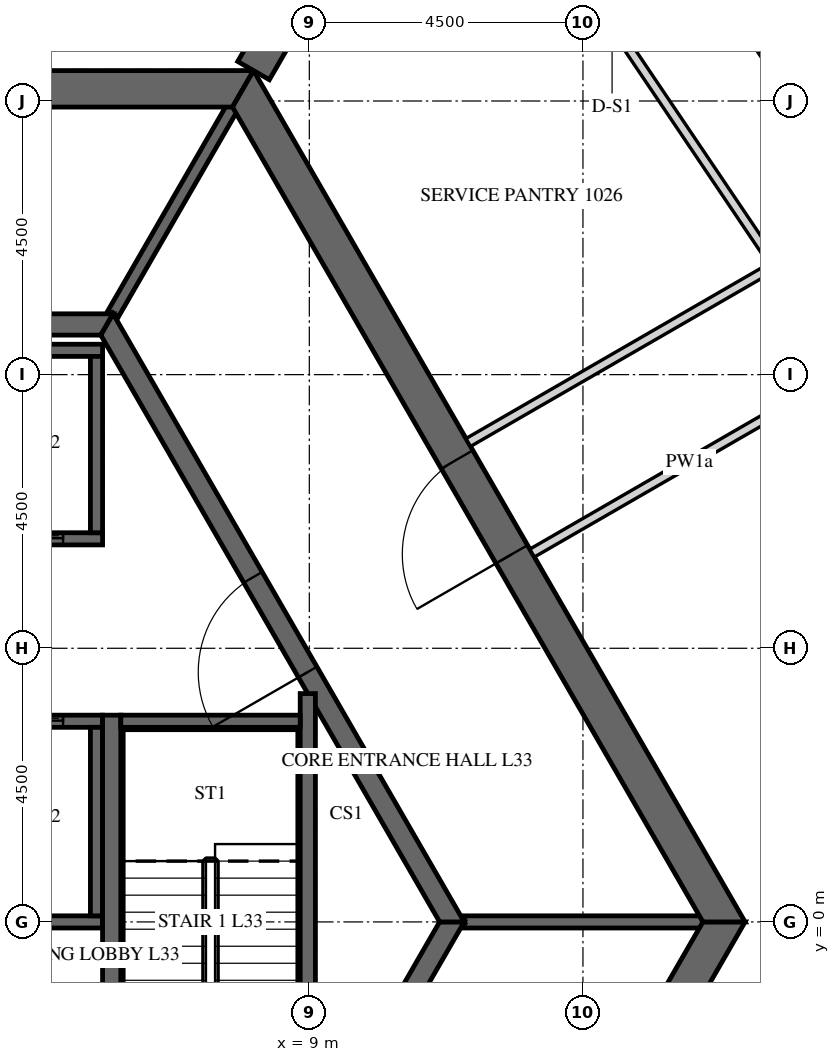
"""IFC4 building model, lengths in metres.
Left out: names, types, materials, properties, quantities, classifications, styles, units other than length and angle.
Written with IfcOpenShell. Run it as: python <this file> out.ifc"""

import sys

from ifc_helpers import new_model, si_unit, direction, frame, frame_2d, origin, place, context, subcontext, project, spatial, polyline, rectangle, outline, extrude, element, fill, save


model = new_model("IFC4")
c1 = context("Model", 3, precision=1e-05, world=origin(), true_north=direction((0.0, 1.0)))
c2 = subcontext(c1, "Body", "Model", "MODEL_VIEW")
j1 = project(units=[si_unit("LENGTHUNIT", "METRE"), si_unit("PLANEANGLEUNIT", "RADIAN")], contexts=[c1])
p1 = place(None, origin())
s1 = spatial("IfcSite", under=j1, at=p1, CompositionType="ELEMENT")
p2 = place(p1, origin())
s2 = spatial("IfcBuilding", under=s1, at=p2, CompositionType="ELEMENT")
p3 = place(p2, frame((0.0, 0.0, 142.8)))
s3 = spatial("IfcBuildingStorey", under=s2, at=p3, CompositionType="ELEMENT", Elevation=142.8)
p4 = place(p3, frame((7.91, -13.7, -0.15), z_axis=(0.0, 0.0, 1.0), x_axis=(0.499999880136, 0.866025472988, 0.0)))
e1 = element("IfcWall", 1, at=p4, inside=s3, PredefinedType="SHEAR", context=c2, shape_type="SweptSolid", body=[
    extrude(outline(polyline([(-0.173, -0.3), (15.993, -0.3), (15.646, 0.3), (0.173, 0.3), (-0.173, -0.3)])), origin(), (0.0, 0.0, 1.0), 3.75),
])
p5 = place(p4, frame((7.039, 0.0, 0.15)))
e2 = element("IfcOpeningElement", 2, at=p5, cuts=e1, PredefinedType="OPENING", context=c2, shape_type="SweptSolid", body=[
    extrude(rectangle(XDim=1.8, YDim=2.4, at=frame_2d((0.9, 1.2))), frame((0.0, 0.31, 0.0), z_axis=(0.0, -1.0, 0.0), x_axis=(1.0, 0.0, 0.0)), (0.0, 0.0, 1.0), 0.62),
])
p6 = place(p3, frame((15.819, 0.0, -0.15), z_axis=(0.0, 0.0, 1.0), x_axis=(-0.499999880136, 0.866025472988, 0.0)))
e3 = element("IfcWall", 3, at=p6, inside=s3, PredefinedType="SHEAR", context=c2, shape_type="SweptSolid", body=[
    extrude(outline(polyline([(-0.173, -0.3), (15.993, -0.3), (15.646, 0.3), (0.173, 0.3), (-0.173, -0.3)])), origin(), (0.0, 0.0, 1.0), 3.75),
])
p7 = place(p6, frame((6.981, 0.0, 0.15)))
e4 = element("IfcOpeningElement", 4, at=p7, cuts=e3, PredefinedType="OPENING", context=c2, shape_type="SweptSolid", body=[
    extrude(rectangle(XDim=1.8, YDim=2.4, at=frame_2d((0.9, 1.2))), frame((0.0, 0.31, 0.0), z_axis=(0.0, -1.0, 0.0), x_axis=(1.0, 0.0, 0.0)), (0.0, 0.0, 1.0), 0.62),
])
p8 = place(p3, frame((7.91, 13.7, -0.15), z_axis=(0.0, 0.0, 1.0), x_axis=(-1.0, 0.0, 0.0)))
e5 = element("IfcWall", 5, at=p8, inside=s3, PredefinedType="SHEAR", context=c2, shape_type="SweptSolid", body=[
    extrude(outline(polyline([(-0.173, -0.3), (15.993, -0.3), (15.646, 0.3), (0.173, 0.3), (-0.173, -0.3)])), origin(), (0.0, 0.0, 1.0), 3.75),
])
p9 = place(p8, frame((7.31, 0.0, 0.15)))
e6 = element("IfcOpeningElement", 6, at=p9, cuts=e5, PredefinedType="OPENING", context=c2, shape_type="SweptSolid", body=[
    extrude(rectangle(XDim=1.2, YDim=2.4, at=frame_2d((0.6, 1.2))), frame((0.0, 0.31, 0.0), z_axis=(0.0, -1.0, 0.0), x_axis=(1.0, 0.0, 0.0)), (0.0, 0.0, 1.0), 0.62),
])
p10 = place(p3, frame((8.083, 14.0, -0.15), z_axis=(0.0, 0.0, 1.0), x_axis=(0.499997680643, 0.866026742862, 0.0)))
e7 = element("IfcWall", 7, at=p10, inside=s3, PredefinedType="SHEAR", context=c2, shape_type="SweptSolid", body=[
    extrude(rectangle(XDim=16.509, YDim=0.6, at=frame_2d((8.254, 0.0))), origin(), (0.0, 0.0, 1.0), 3.75),
])
p11 = place(p10, frame((7.354, 0.0, 0.15)))
e8 = element("IfcOpeningElement", 8, at=p11, cuts=e7, PredefinedType="OPENING", context=c2, shape_type="SweptSolid", body=[
    extrude(rectangle(XDim=1.8, YDim=2.4, at=frame_2d((0.9, 1.2))), frame((0.0, 0.31, 0.0), z_axis=(0.0, -1.0, 0.0), x_axis=(1.0, 0.0, 0.0)), (0.0, 0.0, 1.0), 0.62),
])
p12 = place(p3, frame((5.673, -9.825, -0.15), z_axis=(0.0, 0.0, 1.0), x_axis=(0.499995046907, 0.866028263435, 0.0)))
e9 = element("IfcWall", 9, at=p12, inside=s3, PredefinedType="SHEAR", context=c2, shape_type="SweptSolid", body=[
    extrude(outline(polyline([(-0.101, -0.175), (11.446, -0.175), (11.244, 0.175), (0.101, 0.175), (-0.101, -0.175)])), origin(), (0.0, 0.0, 1.0), 3.75),
])
p13 = place(p12, frame((4.801, 0.0, 0.15)))
e10 = element("IfcOpeningElement", 10, at=p13, cuts=e9, PredefinedType="OPENING", context=c2, shape_type="SweptSolid", body=[
    extrude(rectangle(XDim=1.8, YDim=2.4, at=frame_2d((0.9, 1.2))), frame((0.0, 0.185, 0.0), z_axis=(0.0, -1.0, 0.0), x_axis=(1.0, 0.0, 0.0)), (0.0, 0.0, 1.0), 0.37),
])
p14 = place(p3, frame((11.345, 0.0, -0.15), z_axis=(0.0, 0.0, 1.0), x_axis=(-0.499995046907, 0.866028263435, 0.0)))
e11 = element("IfcWall", 11, at=p14, inside=s3, PredefinedType="SHEAR", context=c2, shape_type="SweptSolid", body=[
    extrude(outline(polyline([(-0.101, -0.175), (11.446, -0.175), (11.244, 0.175), (0.101, 0.175), (-0.101, -0.175)])), origin(), (0.0, 0.0, 1.0), 3.75),
])
p15 = place(p14, frame((4.744, 0.0, 0.15)))
e12 = element("IfcOpeningElement", 12, at=p15, cuts=e11, PredefinedType="OPENING", context=c2, shape_type="SweptSolid", body=[
    extrude(rectangle(XDim=1.8, YDim=2.4, at=frame_2d((0.9, 1.2))), frame((0.0, 0.185, 0.0), z_axis=(0.0, -1.0, 0.0), x_axis=(1.0, 0.0, 0.0)), (0.0, 0.0, 1.0), 0.37),
])
p16 = place(p3, frame((5.673, 9.825, -0.15), z_axis=(0.0, 0.0, 1.0), x_axis=(-1.0, 0.0, 0.0)))
e13 = element("IfcWall", 13, at=p16, inside=s3, PredefinedType="SHEAR", context=c2, shape_type="SweptSolid", body=[
    extrude(outline(polyline([(-0.101, -0.175), (11.446, -0.175), (11.244, 0.175), (0.101, 0.175), (-0.101, -0.175)])), origin(), (0.0, 0.0, 1.0), 3.75),
])
p17 = place(p3, frame((-5.6, 6.3, -0.25), z_axis=(0.0, 0.0, 1.0), x_axis=(1.0, 0.0, 0.0)))
e14 = element("IfcWall", 14, at=p17, inside=s3, PredefinedType="SHEAR", context=c2, shape_type="SweptSolid", body=[
    extrude(rectangle(XDim=11.2, YDim=0.2, at=frame_2d((5.6, 0.0))), origin(), (0.0, 0.0, 1.0), 3.9),
])
p18 = place(p17, frame((0.65, 0.0, 0.25)))
e15 = element("IfcOpeningElement", 15, at=p18, cuts=e14, PredefinedType="OPENING", context=c2, shape_type="SweptSolid", body=[
    extrude(rectangle(XDim=1.1, YDim=2.1, at=frame_2d((0.55, 1.05))), frame((0.0, 0.11, 0.0), z_axis=(0.0, -1.0, 0.0), x_axis=(1.0, 0.0, 0.0)), (0.0, 0.0, 1.0), 0.22),
])
p19 = place(p17, frame((2.85, 0.0, 0.25)))
e16 = element("IfcOpeningElement", 16, at=p19, cuts=e14, PredefinedType="OPENING", context=c2, shape_type="SweptSolid", body=[
    extrude(rectangle(XDim=1.1, YDim=2.1, at=frame_2d((0.55, 1.05))), frame((0.0, 0.11, 0.0), z_axis=(0.0, -1.0, 0.0), x_axis=(1.0, 0.0, 0.0)), (0.0, 0.0, 1.0), 0.22),
])
p20 = place(p17, frame((5.05, 0.0, 0.25)))
e17 = element("IfcOpeningElement", 17, at=p20, cuts=e14, PredefinedType="OPENING", context=c2, shape_type="SweptSolid", body=[
    extrude(rectangle(XDim=1.1, YDim=2.1, at=frame_2d((0.55, 1.05))), frame((0.0, 0.11, 0.0), z_axis=(0.0, -1.0, 0.0), x_axis=(1.0, 0.0, 0.0)), (0.0, 0.0, 1.0), 0.22),
])
p21 = place(p17, frame((7.25, 0.0, 0.25)))
e18 = element("IfcOpeningElement", 18, at=p21, cuts=e14, PredefinedType="OPENING", context=c2, shape_type="SweptSolid", body=[
    extrude(rectangle(XDim=1.1, YDim=2.1, at=frame_2d((0.55, 1.05))), frame((0.0, 0.11, 0.0), z_axis=(0.0, -1.0, 0.0), x_axis=(1.0, 0.0, 0.0)), (0.0, 0.0, 1.0), 0.22),
])
p22 = place(p17, frame((9.45, 0.0, 0.25)))
e19 = element("IfcOpeningElement", 19, at=p22, cuts=e14, PredefinedType="OPENING", context=c2, shape_type="SweptSolid", body=[
    extrude(rectangle(XDim=1.1, YDim=2.1, at=frame_2d((0.55, 1.05))), frame((0.0, 0.11, 0.0), z_axis=(0.0, -1.0, 0.0), x_axis=(1.0, 0.0, 0.0)), (0.0, 0.0, 1.0), 0.22),
])
p23 = place(p3, frame((-5.6, 9.4, -0.25), z_axis=(0.0, 0.0, 1.0), x_axis=(1.0, 0.0, 0.0)))
e20 = element("IfcWall", 20, at=p23, inside=s3, PredefinedType="SHEAR", context=c2, shape_type="SweptSolid", body=[
    extrude(rectangle(XDim=11.2, YDim=0.2, at=frame_2d((5.6, 0.0))), origin(), (0.0, 0.0, 1.0), 3.9),
])
p24 = place(p3, frame((5.5, 6.4, -0.25), z_axis=(0.0, 0.0, 1.0), x_axis=(0.0, 1.0, 0.0)))
e21 = element("IfcWall", 21, at=p24, inside=s3, PredefinedType="SHEAR", context=c2, shape_type="SweptSolid", body=[
    extrude(rectangle(XDim=2.9, YDim=0.2, at=frame_2d((1.45, 0.0))), origin(), (0.0, 0.0, 1.0), 3.9),
])
p25 = place(p3, frame((-5.6, 3.3, -0.25), z_axis=(0.0, 0.0, 1.0), x_axis=(1.0, 0.0, 0.0)))
e22 = element("IfcWall", 22, at=p25, inside=s3, PredefinedType="SHEAR", context=c2, shape_type="SweptSolid", body=[
    extrude(rectangle(XDim=11.2, YDim=0.2, at=frame_2d((5.6, 0.0))), origin(), (0.0, 0.0, 1.0), 3.9),
])
p26 = place(p25, frame((0.65, 0.0, 0.25)))
e23 = element("IfcOpeningElement", 23, at=p26, cuts=e22, PredefinedType="OPENING", context=c2, shape_type="SweptSolid", body=[
    extrude(rectangle(XDim=1.1, YDim=2.1, at=frame_2d((0.55, 1.05))), frame((0.0, 0.11, 0.0), z_axis=(0.0, -1.0, 0.0), x_axis=(1.0, 0.0, 0.0)), (0.0, 0.0, 1.0), 0.22),
])
p27 = place(p25, frame((2.85, 0.0, 0.25)))
e24 = element("IfcOpeningElement", 24, at=p27, cuts=e22, PredefinedType="OPENING", context=c2, shape_type="SweptSolid", body=[
    extrude(rectangle(XDim=1.1, YDim=2.1, at=frame_2d((0.55, 1.05))), frame((0.0, 0.11, 0.0), z_axis=(0.0, -1.0, 0.0), x_axis=(1.0, 0.0, 0.0)), (0.0, 0.0, 1.0), 0.22),
])
p28 = place(p25, frame((5.05, 0.0, 0.25)))
e25 = element("IfcOpeningElement", 25, at=p28, cuts=e22, PredefinedType="OPENING", context=c2, shape_type="SweptSolid", body=[
    extrude(rectangle(XDim=1.1, YDim=2.1, at=frame_2d((0.55, 1.05))), frame((0.0, 0.11, 0.0), z_axis=(0.0, -1.0, 0.0), x_axis=(1.0, 0.0, 0.0)), (0.0, 0.0, 1.0), 0.22),
])
p29 = place(p25, frame((7.25, 0.0, 0.25)))
e26 = element("IfcOpeningElement", 26, at=p29, cuts=e22, PredefinedType="OPENING", context=c2, shape_type="SweptSolid", body=[
    extrude(rectangle(XDim=1.1, YDim=2.1, at=frame_2d((0.55, 1.05))), frame((0.0, 0.11, 0.0), z_axis=(0.0, -1.0, 0.0), x_axis=(1.0, 0.0, 0.0)), (0.0, 0.0, 1.0), 0.22),
])
p30 = place(p25, frame((9.45, 0.0, 0.25)))
e27 = element("IfcOpeningElement", 27, at=p30, cuts=e22, PredefinedType="OPENING", context=c2, shape_type="SweptSolid", body=[
    extrude(rectangle(XDim=1.1, YDim=2.1, at=frame_2d((0.55, 1.05))), frame((0.0, 0.11, 0.0), z_axis=(0.0, -1.0, 0.0), x_axis=(1.0, 0.0, 0.0)), (0.0, 0.0, 1.0), 0.22),
])
p31 = place(p3, frame((-5.6, 0.0, -0.25), z_axis=(0.0, 0.0, 1.0), x_axis=(1.0, 0.0, 0.0)))
e28 = element("IfcWall", 28, at=p31, inside=s3, PredefinedType="SHEAR", context=c2, shape_type="SweptSolid", body=[
    extrude(rectangle(XDim=11.2, YDim=0.2, at=frame_2d((5.6, 0.0))), origin(), (0.0, 0.0, 1.0), 3.9),
])
p32 = place(p3, frame((5.5, 0.1, -0.25), z_axis=(0.0, 0.0, 1.0), x_axis=(0.0, 1.0, 0.0)))
e29 = element("IfcWall", 29, at=p32, inside=s3, PredefinedType="SHEAR", context=c2, shape_type="SweptSolid", body=[
    extrude(rectangle(XDim=3.1, YDim=0.2, at=frame_2d((1.55, 0.0))), origin(), (0.0, 0.0, 1.0), 3.9),
])
p33 = place(p3, frame((11.547, 0.0, -0.15), z_axis=(0.0, 0.0, 1.0), x_axis=(1.0, 0.0, 0.0)))
e30 = element("IfcWall", 30, at=p33, inside=s3, PredefinedType="SHEAR", context=c2, shape_type="SweptSolid", body=[
    extrude(rectangle(XDim=3.926, YDim=0.2, at=frame_2d((1.963, 0.0))), origin(), (0.0, 0.0, 1.0), 3.75),
])
p34 = place(p3, frame((5.773, 10.0, -0.15), z_axis=(0.0, 0.0, 1.0), x_axis=(0.500038251005, 0.86600331843, 0.0)))
e31 = element("IfcWall", 31, at=p34, inside=s3, PredefinedType="SHEAR", context=c2, shape_type="SweptSolid", body=[
    extrude(rectangle(XDim=3.926, YDim=0.2, at=frame_2d((1.963, 0.0))), origin(), (0.0, 0.0, 1.0), 3.75),
])
p35 = place(p3, frame((5.75, -3.4, -0.25), z_axis=(0.0, 0.0, 1.0), x_axis=(0.0, 1.0, 0.0)))
e32 = element("IfcWall", 32, at=p35, inside=s3, PredefinedType="SHEAR", context=c2, shape_type="SweptSolid", body=[
    extrude(rectangle(XDim=6.8, YDim=0.3, at=frame_2d((3.4, 0.0))), origin(), (0.0, 0.0, 1.0), 3.9),
])
p36 = place(p3, frame((8.975, -3.755, -0.25), z_axis=(0.0, 0.0, 1.0), x_axis=(0.0, 1.0, 0.0)))
e33 = element("IfcWall", 33, at=p36, inside=s3, PredefinedType="SHEAR", context=c2, shape_type="SweptSolid", body=[
    extrude(rectangle(XDim=7.51, YDim=0.25, at=frame_2d((3.755, 0.0))), origin(), (0.0, 0.0, 1.0), 3.9),
])
p37 = place(p3, frame((5.9, 3.3, -0.25), z_axis=(0.0, 0.0, 1.0), x_axis=(1.0, 0.0, 0.0)))
e34 = element("IfcWall", 34, at=p37, inside=s3, PredefinedType="SHEAR", context=c2, shape_type="SweptSolid", body=[
    extrude(rectangle(XDim=2.95, YDim=0.2, at=frame_2d((1.475, 0.0))), origin(), (0.0, 0.0, 1.0), 3.9),
])
p38 = place(p3, frame((13.755, -19.475, 0.0), z_axis=(0.0, 0.0, 1.0), x_axis=(0.50000013933, 0.866025323342, 0.0)))
e35 = element("IfcWall", 35, at=p38, inside=s3, PredefinedType="PARTITIONING", context=c2, shape_type="SweptSolid", body=[
    extrude(rectangle(XDim=23.517, YDim=0.15, at=frame_2d((11.758, 0.0))), origin(), (0.0, 0.0, 1.0), 2.838),
])
p39 = place(p38, frame((4.456, 0.0, 0.0)))
e36 = element("IfcOpeningElement", 36, at=p39, cuts=e35, PredefinedType="OPENING", context=c2, shape_type="SweptSolid", body=[
    extrude(rectangle(XDim=1.0, YDim=2.1, at=frame_2d((0.5, 1.05))), frame((0.0, 0.085, 0.0), z_axis=(0.0, -1.0, 0.0), x_axis=(1.0, 0.0, 0.0)), (0.0, 0.0, 1.0), 0.17),
])
p40 = place(p38, frame((13.699, 0.0, 0.0)))
e37 = element("IfcOpeningElement", 37, at=p40, cuts=e35, PredefinedType="OPENING", context=c2, shape_type="SweptSolid", body=[
    extrude(rectangle(XDim=1.0, YDim=2.1, at=frame_2d((0.5, 1.05))), frame((0.0, 0.085, 0.0), z_axis=(0.0, -1.0, 0.0), x_axis=(1.0, 0.0, 0.0)), (0.0, 0.0, 1.0), 0.17),
])
p41 = place(p38, frame((21.658, 0.0, 0.0)))
e38 = element("IfcOpeningElement", 38, at=p41, cuts=e35, PredefinedType="OPENING", context=c2, shape_type="SweptSolid", body=[
    extrude(rectangle(XDim=1.0, YDim=2.1, at=frame_2d((0.5, 1.05))), frame((0.0, 0.085, 0.0), z_axis=(0.0, -1.0, 0.0), x_axis=(1.0, 0.0, 0.0)), (0.0, 0.0, 1.0), 0.17),
])
p42 = place(p3, frame((25.467, 0.96, 0.0), z_axis=(0.0, 0.0, 1.0), x_axis=(-0.559200743185, 0.829032284547, 0.0)))
e39 = element("IfcWall", 39, at=p42, inside=s3, PredefinedType="PARTITIONING", context=c2, shape_type="SweptSolid", body=[
    extrude(rectangle(XDim=21.668, YDim=0.15, at=frame_2d((10.834, 0.0))), origin(), (0.0, 0.0, 1.0), 2.838),
])
p43 = place(p42, frame((10.434, 0.0, 0.0)))
e40 = element("IfcOpeningElement", 40, at=p43, cuts=e39, PredefinedType="OPENING", context=c2, shape_type="SweptSolid", body=[
    extrude(rectangle(XDim=1.0, YDim=2.1, at=frame_2d((0.5, 1.05))), frame((0.0, 0.085, 0.0), z_axis=(0.0, -1.0, 0.0), x_axis=(1.0, 0.0, 0.0)), (0.0, 0.0, 1.0), 0.17),
])
p44 = place(p3, frame((12.664, 6.066, 0.0), z_axis=(0.0, 0.0, 1.0), x_axis=(0.866018848283, 0.500011354289, 0.0)))
e41 = element("IfcWall", 41, at=p44, inside=s3, PredefinedType="PARTITIONING", context=c2, shape_type="SweptSolid", body=[
    extrude(rectangle(XDim=5.974, YDim=0.15, at=frame_2d((2.987, 0.0))), origin(), (0.0, 0.0, 1.0), 2.838),
])
p45 = place(p3, frame((11.298, 18.748, 0.0), z_axis=(0.0, 0.0, 1.0), x_axis=(0.559198234291, -0.829033976847, 0.0)))
e42 = element("IfcWall", 42, at=p45, inside=s3, PredefinedType="PARTITIONING", context=c2, shape_type="SweptSolid", body=[
    extrude(rectangle(XDim=9.59, YDim=0.15, at=frame_2d((4.795, 0.0))), origin(), (0.0, 0.0, 1.0), 2.838),
])
p46 = place(p45, frame((4.345, 0.0, 0.0)))
e43 = element("IfcOpeningElement", 43, at=p46, cuts=e42, PredefinedType="OPENING", context=c2, shape_type="SweptSolid", body=[
    extrude(rectangle(XDim=0.9, YDim=2.1, at=frame_2d((0.45, 1.05))), frame((0.0, 0.085, 0.0), z_axis=(0.0, -1.0, 0.0), x_axis=(1.0, 0.0, 0.0)), (0.0, 0.0, 1.0), 0.17),
])
p47 = place(p3, frame((16.595, 10.76, 0.0), z_axis=(0.0, 0.0, 1.0), x_axis=(-0.866019477104, -0.500010265171, 0.0)))
e44 = element("IfcWall", 44, at=p47, inside=s3, PredefinedType="PARTITIONING", context=c2, shape_type="SweptSolid", body=[
    extrude(rectangle(XDim=5.752, YDim=0.15, at=frame_2d((2.876, 0.0))), origin(), (0.0, 0.0, 1.0), 2.838),
])
p48 = place(p7, origin())
e45 = element("IfcDoor", 45, at=p48, inside=s3, OperationType="DOUBLE_DOOR_SINGLE_SWING", PredefinedType="DOOR", context=c2, shape_type="SweptSolid", body=[
    extrude(rectangle(XDim=1.8, YDim=2.4, at=frame_2d((0.9, 1.2))), frame((0.0, 0.025, 0.0), z_axis=(0.0, -1.0, 0.0), x_axis=(1.0, 0.0, 0.0)), (0.0, 0.0, 1.0), 0.05),
])
fill(e4, e45)
p49 = place(p15, origin())
e46 = element("IfcDoor", 46, at=p49, inside=s3, OperationType="DOUBLE_DOOR_SINGLE_SWING", PredefinedType="DOOR", context=c2, shape_type="SweptSolid", body=[
    extrude(rectangle(XDim=1.8, YDim=2.4, at=frame_2d((0.9, 1.2))), frame((0.0, 0.025, 0.0), z_axis=(0.0, -1.0, 0.0), x_axis=(1.0, 0.0, 0.0)), (0.0, 0.0, 1.0), 0.05),
])
fill(e12, e46)
p50 = place(p22, origin())
e47 = element("IfcDoor", 47, at=p50, inside=s3, OperationType="SLIDING_TO_LEFT", PredefinedType="DOOR", context=c2, shape_type="SweptSolid", body=[
    extrude(rectangle(XDim=1.1, YDim=2.1, at=frame_2d((0.55, 1.05))), frame((0.0, 0.025, 0.0), z_axis=(0.0, -1.0, 0.0), x_axis=(1.0, 0.0, 0.0)), (0.0, 0.0, 1.0), 0.05),
])
fill(e19, e47)
p51 = place(p30, origin())
e48 = element("IfcDoor", 48, at=p51, inside=s3, OperationType="SLIDING_TO_LEFT", PredefinedType="DOOR", context=c2, shape_type="SweptSolid", body=[
    extrude(rectangle(XDim=1.1, YDim=2.1, at=frame_2d((0.55, 1.05))), frame((0.0, 0.025, 0.0), z_axis=(0.0, -1.0, 0.0), x_axis=(1.0, 0.0, 0.0)), (0.0, 0.0, 1.0), 0.05),
])
fill(e27, e48)
save(model, sys.argv[1])
